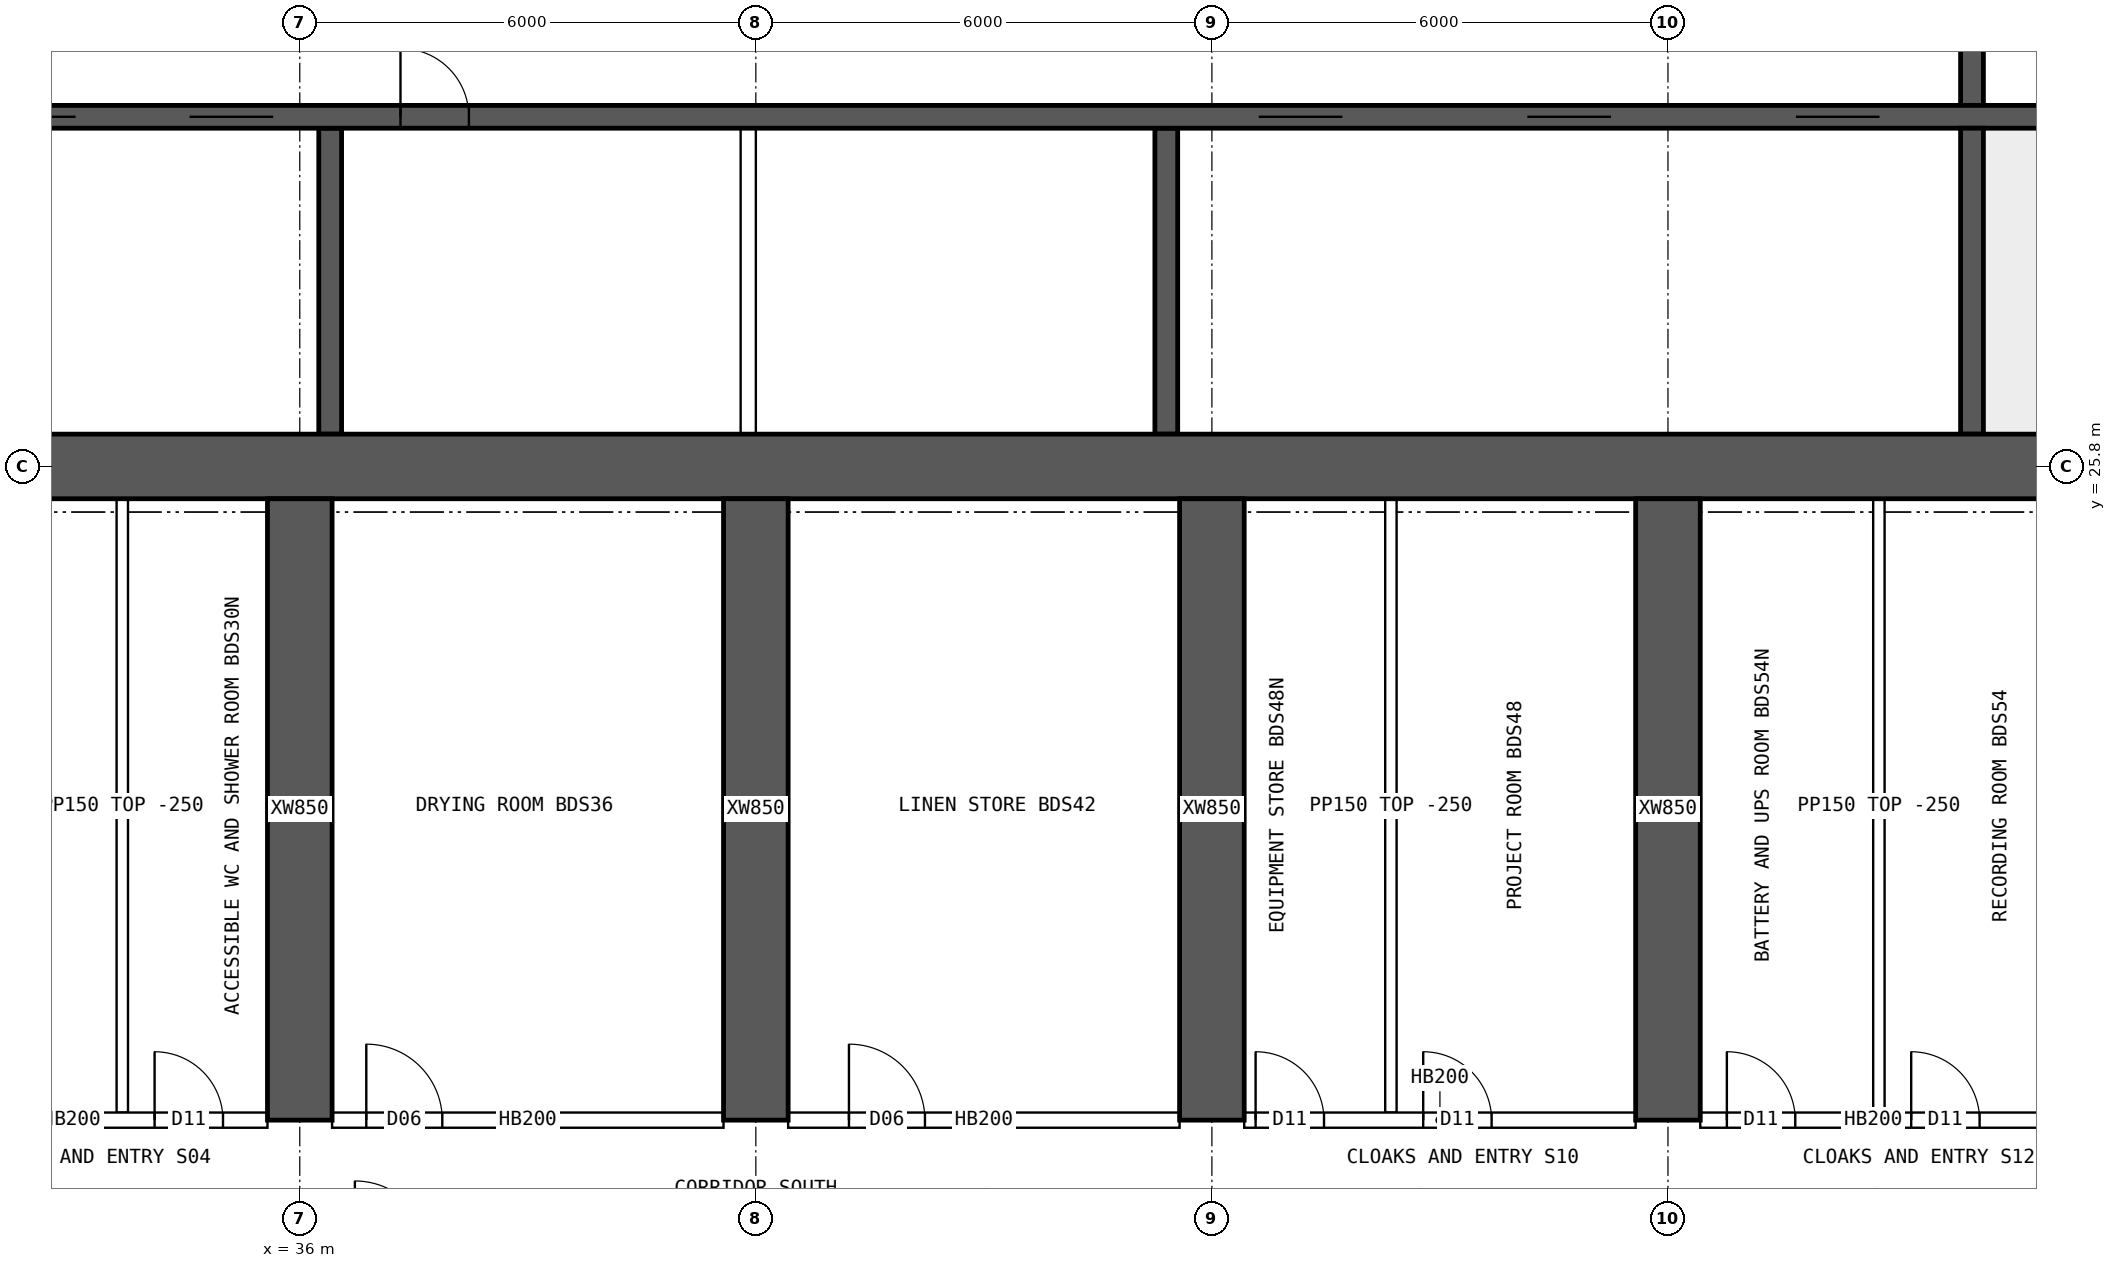
"""IFC4 building model, lengths in metres.
Left out: names, types, materials, properties, quantities, classifications, styles, units other than length and angle.
Written with IfcOpenShell. Run it as: python <this file> out.ifc"""

import sys

from ifc_helpers import new_model, si_unit, direction, frame, frame_2d, origin, place, context, subcontext, project, spatial, rectangle, extrude, element, fill, save


model = new_model("IFC4")
c1 = context("Model", 3, precision=1e-05, world=origin(), true_north=direction((0.0, 1.0)))
c2 = subcontext(c1, "Body", "Model", "MODEL_VIEW")
j1 = project(units=[si_unit("LENGTHUNIT", "METRE"), si_unit("PLANEANGLEUNIT", "RADIAN")], contexts=[c1])
p1 = place(None, origin())
s1 = spatial("IfcSite", under=j1, at=p1, CompositionType="ELEMENT")
p2 = place(p1, origin())
s2 = spatial("IfcBuilding", under=s1, at=p2, CompositionType="ELEMENT")
p3 = place(p2, frame((0.0, 0.0, 178.6)))
s3 = spatial("IfcBuildingStorey", under=s2, at=p3, CompositionType="ELEMENT", Elevation=178.6)
p4 = place(p3, frame((18.0, 25.8, 0.0), z_axis=(0.0, 0.0, 1.0), x_axis=(1.0, 0.0, 0.0)))
e1 = element("IfcWall", 1, at=p4, inside=s3, PredefinedType="SHEAR", context=c2, shape_type="SweptSolid", body=[
    extrude(rectangle(XDim=48.0, YDim=0.85, at=frame_2d((24.0, 0.0))), origin(), (0.0, 0.0, 1.0), 3.75),
])
p5 = place(p3, frame((18.425, 30.4, 0.0), z_axis=(0.0, 0.0, 1.0), x_axis=(1.0, 0.0, 0.0)))
e2 = element("IfcWall", 2, at=p5, inside=s3, PredefinedType="SHEAR", context=c2, shape_type="SweptSolid", body=[
    extrude(rectangle(XDim=47.15, YDim=0.3, at=frame_2d((23.575, 0.0))), origin(), (0.0, 0.0, 1.0), 3.75),
])
p6 = place(p5, frame((0.4, 0.0, 0.0)))
e3 = element("IfcOpeningElement", 3, at=p6, cuts=e2, PredefinedType="OPENING", context=c2, shape_type="SweptSolid", body=[
    extrude(rectangle(XDim=1.0, YDim=2.1, at=frame_2d((0.5, 1.05))), frame((0.0, 0.16, 0.0), z_axis=(0.0, -1.0, 0.0), x_axis=(1.0, 0.0, 0.0)), (0.0, 0.0, 1.0), 0.32),
])
p7 = place(p5, frame((45.75, 0.0, 0.0)))
e4 = element("IfcOpeningElement", 4, at=p7, cuts=e2, PredefinedType="OPENING", context=c2, shape_type="SweptSolid", body=[
    extrude(rectangle(XDim=1.0, YDim=2.1, at=frame_2d((0.5, 1.05))), frame((0.0, 0.16, 0.0), z_axis=(0.0, -1.0, 0.0), x_axis=(1.0, 0.0, 0.0)), (0.0, 0.0, 1.0), 0.32),
])
p8 = place(p5, frame((8.325, 0.0, 0.0)))
e5 = element("IfcOpeningElement", 5, at=p8, cuts=e2, PredefinedType="OPENING", context=c2, shape_type="SweptSolid", body=[
    extrude(rectangle(XDim=1.1, YDim=2.1, at=frame_2d((0.55, 1.05))), frame((0.0, 0.16, 0.0), z_axis=(0.0, -1.0, 0.0), x_axis=(1.0, 0.0, 0.0)), (0.0, 0.0, 1.0), 0.32),
])
p9 = place(p5, frame((10.925, 0.0, 0.0)))
e6 = element("IfcOpeningElement", 6, at=p9, cuts=e2, PredefinedType="OPENING", context=c2, shape_type="SweptSolid", body=[
    extrude(rectangle(XDim=1.1, YDim=2.1, at=frame_2d((0.55, 1.05))), frame((0.0, 0.16, 0.0), z_axis=(0.0, -1.0, 0.0), x_axis=(1.0, 0.0, 0.0)), (0.0, 0.0, 1.0), 0.32),
])
p10 = place(p5, frame((13.525, 0.0, 0.0)))
e7 = element("IfcOpeningElement", 7, at=p10, cuts=e2, PredefinedType="OPENING", context=c2, shape_type="SweptSolid", body=[
    extrude(rectangle(XDim=1.1, YDim=2.1, at=frame_2d((0.55, 1.05))), frame((0.0, 0.16, 0.0), z_axis=(0.0, -1.0, 0.0), x_axis=(1.0, 0.0, 0.0)), (0.0, 0.0, 1.0), 0.32),
])
p11 = place(p5, frame((16.125, 0.0, 0.0)))
e8 = element("IfcOpeningElement", 8, at=p11, cuts=e2, PredefinedType="OPENING", context=c2, shape_type="SweptSolid", body=[
    extrude(rectangle(XDim=1.1, YDim=2.1, at=frame_2d((0.55, 1.05))), frame((0.0, 0.16, 0.0), z_axis=(0.0, -1.0, 0.0), x_axis=(1.0, 0.0, 0.0)), (0.0, 0.0, 1.0), 0.32),
])
p12 = place(p5, frame((18.9, 0.0, 0.0)))
e9 = element("IfcOpeningElement", 9, at=p12, cuts=e2, PredefinedType="OPENING", context=c2, shape_type="SweptSolid", body=[
    extrude(rectangle(XDim=0.9, YDim=2.1, at=frame_2d((0.45, 1.05))), frame((0.0, 0.16, 0.0), z_axis=(0.0, -1.0, 0.0), x_axis=(1.0, 0.0, 0.0)), (0.0, 0.0, 1.0), 0.32),
])
p13 = place(p5, frame((30.192, 0.0, 0.0)))
e10 = element("IfcOpeningElement", 10, at=p13, cuts=e2, PredefinedType="OPENING", context=c2, shape_type="SweptSolid", body=[
    extrude(rectangle(XDim=1.1, YDim=2.1, at=frame_2d((0.55, 1.05))), frame((0.0, 0.16, 0.0), z_axis=(0.0, -1.0, 0.0), x_axis=(1.0, 0.0, 0.0)), (0.0, 0.0, 1.0), 0.32),
])
p14 = place(p5, frame((33.725, 0.0, 0.0)))
e11 = element("IfcOpeningElement", 11, at=p14, cuts=e2, PredefinedType="OPENING", context=c2, shape_type="SweptSolid", body=[
    extrude(rectangle(XDim=1.1, YDim=2.1, at=frame_2d((0.55, 1.05))), frame((0.0, 0.16, 0.0), z_axis=(0.0, -1.0, 0.0), x_axis=(1.0, 0.0, 0.0)), (0.0, 0.0, 1.0), 0.32),
])
p15 = place(p5, frame((37.258, 0.0, 0.0)))
e12 = element("IfcOpeningElement", 12, at=p15, cuts=e2, PredefinedType="OPENING", context=c2, shape_type="SweptSolid", body=[
    extrude(rectangle(XDim=1.1, YDim=2.1, at=frame_2d((0.55, 1.05))), frame((0.0, 0.16, 0.0), z_axis=(0.0, -1.0, 0.0), x_axis=(1.0, 0.0, 0.0)), (0.0, 0.0, 1.0), 0.32),
])
p16 = place(p3, frame((58.0, 26.225, 0.0), z_axis=(0.0, 0.0, 1.0), x_axis=(0.0, 1.0, 0.0)))
e13 = element("IfcWall", 13, at=p16, inside=s3, PredefinedType="SHEAR", context=c2, shape_type="SweptSolid", body=[
    extrude(rectangle(XDim=4.025, YDim=0.3, at=frame_2d((2.012, 0.0))), origin(), (0.0, 0.0, 1.0), 3.75),
])
p17 = place(p3, frame((58.0, 30.55, 0.0), z_axis=(0.0, 0.0, 1.0), x_axis=(0.0, 1.0, 0.0)))
e14 = element("IfcWall", 14, at=p17, inside=s3, PredefinedType="SHEAR", context=c2, shape_type="SweptSolid", body=[
    extrude(rectangle(XDim=3.9, YDim=0.3, at=frame_2d((1.95, 0.0))), origin(), (0.0, 0.0, 1.0), 3.75),
])
p18 = place(p17, frame((1.4, 0.0, 0.0)))
e15 = element("IfcOpeningElement", 15, at=p18, cuts=e14, PredefinedType="OPENING", context=c2, shape_type="SweptSolid", body=[
    extrude(rectangle(XDim=1.2, YDim=2.1, at=frame_2d((0.6, 1.05))), frame((0.0, 0.16, 0.0), z_axis=(0.0, -1.0, 0.0), x_axis=(1.0, 0.0, 0.0)), (0.0, 0.0, 1.0), 0.32),
])
for number, where, z_axis, x_axis in (
    (16, (36.4, 26.225, 0.0), (0.0, 0.0, 1.0), (0.0, 1.0, 0.0)),
    (17, (47.4, 26.225, 0.0), (0.0, 0.0, 1.0), (0.0, 1.0, 0.0)),
):
    element("IfcWall", number, at=place(p3, frame(where, z_axis=z_axis, x_axis=x_axis)), inside=s3, PredefinedType="SHEAR", context=c2, shape_type="SweptSolid", body=[
        extrude(rectangle(XDim=4.025, YDim=0.3, at=frame_2d((2.012, 0.0))), origin(), (0.0, 0.0, 1.0), 3.75),
    ])
for number, where, z_axis, x_axis in (
    (18, (36.0, 17.2, 0.0), (0.0, 0.0, 1.0), (0.0, 1.0, 0.0)),
    (19, (42.0, 17.2, 0.0), (0.0, 0.0, 1.0), (0.0, 1.0, 0.0)),
    (20, (48.0, 17.2, 0.0), (0.0, 0.0, 1.0), (0.0, 1.0, 0.0)),
    (21, (54.0, 17.2, 0.0), (0.0, 0.0, 1.0), (0.0, 1.0, 0.0)),
):
    element("IfcWall", number, at=place(p3, frame(where, z_axis=z_axis, x_axis=x_axis)), inside=s3, PredefinedType="SHEAR", context=c2, shape_type="SweptSolid", body=[
        extrude(rectangle(XDim=8.175, YDim=0.85, at=frame_2d((4.087, 0.0))), origin(), (0.0, 0.0, 1.0), 3.75),
    ])
p19 = place(p3, frame((41.9, 26.225, 0.0), z_axis=(0.0, 0.0, 1.0), x_axis=(0.0, 1.0, 0.0)))
e22 = element("IfcWall", 22, at=p19, inside=s3, PredefinedType="SOLIDWALL", context=c2, shape_type="SweptSolid", body=[
    extrude(rectangle(XDim=4.025, YDim=0.2, at=frame_2d((2.012, 0.0))), origin(), (0.0, 0.0, 1.0), 3.5),
])
p20 = place(p3, frame((30.425, 17.2, 0.0), z_axis=(0.0, 0.0, 1.0), x_axis=(1.0, 0.0, 0.0)))
e23 = element("IfcWall", 23, at=p20, inside=s3, PredefinedType="SOLIDWALL", context=c2, shape_type="SweptSolid", body=[
    extrude(rectangle(XDim=5.15, YDim=0.2, at=frame_2d((2.575, 0.0))), origin(), (0.0, 0.0, 1.0), 3.5),
])
p21 = place(p20, frame((0.35, 0.0, 0.0)))
e24 = element("IfcOpeningElement", 24, at=p21, cuts=e23, PredefinedType="OPENING", context=c2, shape_type="SweptSolid", body=[
    extrude(rectangle(XDim=0.9, YDim=2.1, at=frame_2d((0.45, 1.05))), frame((0.0, 0.11, 0.0), z_axis=(0.0, -1.0, 0.0), x_axis=(1.0, 0.0, 0.0)), (0.0, 0.0, 1.0), 0.22),
])
p22 = place(p20, frame((3.665, 0.0, 0.0)))
e25 = element("IfcOpeningElement", 25, at=p22, cuts=e23, PredefinedType="OPENING", context=c2, shape_type="SweptSolid", body=[
    extrude(rectangle(XDim=0.9, YDim=2.1, at=frame_2d((0.45, 1.05))), frame((0.0, 0.11, 0.0), z_axis=(0.0, -1.0, 0.0), x_axis=(1.0, 0.0, 0.0)), (0.0, 0.0, 1.0), 0.22),
])
p23 = place(p3, frame((36.425, 17.2, 0.0), z_axis=(0.0, 0.0, 1.0), x_axis=(1.0, 0.0, 0.0)))
e26 = element("IfcWall", 26, at=p23, inside=s3, PredefinedType="SOLIDWALL", context=c2, shape_type="SweptSolid", body=[
    extrude(rectangle(XDim=5.15, YDim=0.2, at=frame_2d((2.575, 0.0))), origin(), (0.0, 0.0, 1.0), 3.5),
])
p24 = place(p23, frame((0.45, 0.0, 0.0)))
e27 = element("IfcOpeningElement", 27, at=p24, cuts=e26, PredefinedType="OPENING", context=c2, shape_type="SweptSolid", body=[
    extrude(rectangle(XDim=1.0, YDim=2.1, at=frame_2d((0.5, 1.05))), frame((0.0, 0.11, 0.0), z_axis=(0.0, -1.0, 0.0), x_axis=(1.0, 0.0, 0.0)), (0.0, 0.0, 1.0), 0.22),
])
p25 = place(p3, frame((42.425, 17.2, 0.0), z_axis=(0.0, 0.0, 1.0), x_axis=(1.0, 0.0, 0.0)))
e28 = element("IfcWall", 28, at=p25, inside=s3, PredefinedType="SOLIDWALL", context=c2, shape_type="SweptSolid", body=[
    extrude(rectangle(XDim=5.15, YDim=0.2, at=frame_2d((2.575, 0.0))), origin(), (0.0, 0.0, 1.0), 3.5),
])
p26 = place(p25, frame((0.8, 0.0, 0.0)))
e29 = element("IfcOpeningElement", 29, at=p26, cuts=e28, PredefinedType="OPENING", context=c2, shape_type="SweptSolid", body=[
    extrude(rectangle(XDim=1.0, YDim=2.1, at=frame_2d((0.5, 1.05))), frame((0.0, 0.11, 0.0), z_axis=(0.0, -1.0, 0.0), x_axis=(1.0, 0.0, 0.0)), (0.0, 0.0, 1.0), 0.22),
])
p27 = place(p3, frame((48.425, 17.2, 0.0), z_axis=(0.0, 0.0, 1.0), x_axis=(1.0, 0.0, 0.0)))
e30 = element("IfcWall", 30, at=p27, inside=s3, PredefinedType="SOLIDWALL", context=c2, shape_type="SweptSolid", body=[
    extrude(rectangle(XDim=5.15, YDim=0.2, at=frame_2d((2.575, 0.0))), origin(), (0.0, 0.0, 1.0), 3.5),
])
p28 = place(p27, frame((0.15, 0.0, 0.0)))
e31 = element("IfcOpeningElement", 31, at=p28, cuts=e30, PredefinedType="OPENING", context=c2, shape_type="SweptSolid", body=[
    extrude(rectangle(XDim=0.9, YDim=2.1, at=frame_2d((0.45, 1.05))), frame((0.0, 0.11, 0.0), z_axis=(0.0, -1.0, 0.0), x_axis=(1.0, 0.0, 0.0)), (0.0, 0.0, 1.0), 0.22),
])
p29 = place(p27, frame((2.355, 0.0, 0.0)))
e32 = element("IfcOpeningElement", 32, at=p29, cuts=e30, PredefinedType="OPENING", context=c2, shape_type="SweptSolid", body=[
    extrude(rectangle(XDim=0.9, YDim=2.1, at=frame_2d((0.45, 1.05))), frame((0.0, 0.11, 0.0), z_axis=(0.0, -1.0, 0.0), x_axis=(1.0, 0.0, 0.0)), (0.0, 0.0, 1.0), 0.22),
])
p30 = place(p3, frame((54.425, 17.2, 0.0), z_axis=(0.0, 0.0, 1.0), x_axis=(1.0, 0.0, 0.0)))
e33 = element("IfcWall", 33, at=p30, inside=s3, PredefinedType="SOLIDWALL", context=c2, shape_type="SweptSolid", body=[
    extrude(rectangle(XDim=5.15, YDim=0.2, at=frame_2d((2.575, 0.0))), origin(), (0.0, 0.0, 1.0), 3.5),
])
p31 = place(p30, frame((0.35, 0.0, 0.0)))
e34 = element("IfcOpeningElement", 34, at=p31, cuts=e33, PredefinedType="OPENING", context=c2, shape_type="SweptSolid", body=[
    extrude(rectangle(XDim=0.9, YDim=2.1, at=frame_2d((0.45, 1.05))), frame((0.0, 0.11, 0.0), z_axis=(0.0, -1.0, 0.0), x_axis=(1.0, 0.0, 0.0)), (0.0, 0.0, 1.0), 0.22),
])
p32 = place(p30, frame((2.775, 0.0, 0.0)))
e35 = element("IfcOpeningElement", 35, at=p32, cuts=e33, PredefinedType="OPENING", context=c2, shape_type="SweptSolid", body=[
    extrude(rectangle(XDim=0.9, YDim=2.1, at=frame_2d((0.45, 1.05))), frame((0.0, 0.11, 0.0), z_axis=(0.0, -1.0, 0.0), x_axis=(1.0, 0.0, 0.0)), (0.0, 0.0, 1.0), 0.22),
])
for number, where, z_axis, x_axis in (
    (36, (33.665, 17.3, 0.0), (0.0, 0.0, 1.0), (0.0, 1.0, 0.0)),
    (37, (50.355, 17.3, 0.0), (0.0, 0.0, 1.0), (0.0, 1.0, 0.0)),
    (38, (56.775, 17.3, 0.0), (0.0, 0.0, 1.0), (0.0, 1.0, 0.0)),
):
    element("IfcWall", number, at=place(p3, frame(where, z_axis=z_axis, x_axis=x_axis)), inside=s3, PredefinedType="PARTITIONING", context=c2, shape_type="SweptSolid", body=[
        extrude(rectangle(XDim=8.075, YDim=0.15, at=frame_2d((4.038, 0.0))), origin(), (0.0, 0.0, 1.0), 3.5),
    ])
p33 = place(p10, origin())
e39 = element("IfcDoor", 39, at=p33, inside=s3, OperationType="DOUBLE_DOOR_SLIDING", PredefinedType="DOOR", context=c2, shape_type="SweptSolid", body=[
    extrude(rectangle(XDim=1.1, YDim=2.1, at=frame_2d((0.55, 1.05))), frame((0.0, 0.025, 0.0), z_axis=(0.0, -1.0, 0.0), x_axis=(1.0, 0.0, 0.0)), (0.0, 0.0, 1.0), 0.05),
])
fill(e7, e39)
p34 = place(p11, origin())
e40 = element("IfcDoor", 40, at=p34, inside=s3, OperationType="DOUBLE_DOOR_SLIDING", PredefinedType="DOOR", context=c2, shape_type="SweptSolid", body=[
    extrude(rectangle(XDim=1.1, YDim=2.1, at=frame_2d((0.55, 1.05))), frame((0.0, 0.025, 0.0), z_axis=(0.0, -1.0, 0.0), x_axis=(1.0, 0.0, 0.0)), (0.0, 0.0, 1.0), 0.05),
])
fill(e8, e40)
p35 = place(p12, origin())
e41 = element("IfcDoor", 41, at=p35, inside=s3, OperationType="SINGLE_SWING_LEFT", PredefinedType="DOOR", context=c2, shape_type="SweptSolid", body=[
    extrude(rectangle(XDim=0.9, YDim=2.1, at=frame_2d((0.45, 1.05))), frame((0.0, 0.025, 0.0), z_axis=(0.0, -1.0, 0.0), x_axis=(1.0, 0.0, 0.0)), (0.0, 0.0, 1.0), 0.05),
])
fill(e9, e41)
p36 = place(p13, origin())
e42 = element("IfcDoor", 42, at=p36, inside=s3, OperationType="DOUBLE_DOOR_SLIDING", PredefinedType="DOOR", context=c2, shape_type="SweptSolid", body=[
    extrude(rectangle(XDim=1.1, YDim=2.1, at=frame_2d((0.55, 1.05))), frame((0.0, 0.025, 0.0), z_axis=(0.0, -1.0, 0.0), x_axis=(1.0, 0.0, 0.0)), (0.0, 0.0, 1.0), 0.05),
])
fill(e10, e42)
p37 = place(p14, origin())
e43 = element("IfcDoor", 43, at=p37, inside=s3, OperationType="DOUBLE_DOOR_SLIDING", PredefinedType="DOOR", context=c2, shape_type="SweptSolid", body=[
    extrude(rectangle(XDim=1.1, YDim=2.1, at=frame_2d((0.55, 1.05))), frame((0.0, 0.025, 0.0), z_axis=(0.0, -1.0, 0.0), x_axis=(1.0, 0.0, 0.0)), (0.0, 0.0, 1.0), 0.05),
])
fill(e11, e43)
p38 = place(p15, origin())
e44 = element("IfcDoor", 44, at=p38, inside=s3, OperationType="DOUBLE_DOOR_SLIDING", PredefinedType="DOOR", context=c2, shape_type="SweptSolid", body=[
    extrude(rectangle(XDim=1.1, YDim=2.1, at=frame_2d((0.55, 1.05))), frame((0.0, 0.025, 0.0), z_axis=(0.0, -1.0, 0.0), x_axis=(1.0, 0.0, 0.0)), (0.0, 0.0, 1.0), 0.05),
])
fill(e12, e44)
p39 = place(p22, origin())
e45 = element("IfcDoor", 45, at=p39, inside=s3, OperationType="SINGLE_SWING_LEFT", PredefinedType="DOOR", context=c2, shape_type="SweptSolid", body=[
    extrude(rectangle(XDim=0.9, YDim=2.1, at=frame_2d((0.45, 1.05))), frame((0.0, 0.025, 0.0), z_axis=(0.0, -1.0, 0.0), x_axis=(1.0, 0.0, 0.0)), (0.0, 0.0, 1.0), 0.05),
])
fill(e25, e45)
p40 = place(p24, origin())
e46 = element("IfcDoor", 46, at=p40, inside=s3, OperationType="SINGLE_SWING_LEFT", PredefinedType="DOOR", context=c2, shape_type="SweptSolid", body=[
    extrude(rectangle(XDim=1.0, YDim=2.1, at=frame_2d((0.5, 1.05))), frame((0.0, 0.025, 0.0), z_axis=(0.0, -1.0, 0.0), x_axis=(1.0, 0.0, 0.0)), (0.0, 0.0, 1.0), 0.05),
])
fill(e27, e46)
p41 = place(p26, origin())
e47 = element("IfcDoor", 47, at=p41, inside=s3, OperationType="SINGLE_SWING_LEFT", PredefinedType="DOOR", context=c2, shape_type="SweptSolid", body=[
    extrude(rectangle(XDim=1.0, YDim=2.1, at=frame_2d((0.5, 1.05))), frame((0.0, 0.025, 0.0), z_axis=(0.0, -1.0, 0.0), x_axis=(1.0, 0.0, 0.0)), (0.0, 0.0, 1.0), 0.05),
])
fill(e29, e47)
p42 = place(p28, origin())
e48 = element("IfcDoor", 48, at=p42, inside=s3, OperationType="SINGLE_SWING_LEFT", PredefinedType="DOOR", context=c2, shape_type="SweptSolid", body=[
    extrude(rectangle(XDim=0.9, YDim=2.1, at=frame_2d((0.45, 1.05))), frame((0.0, 0.025, 0.0), z_axis=(0.0, -1.0, 0.0), x_axis=(1.0, 0.0, 0.0)), (0.0, 0.0, 1.0), 0.05),
])
fill(e31, e48)
p43 = place(p29, origin())
e49 = element("IfcDoor", 49, at=p43, inside=s3, OperationType="SINGLE_SWING_LEFT", PredefinedType="DOOR", context=c2, shape_type="SweptSolid", body=[
    extrude(rectangle(XDim=0.9, YDim=2.1, at=frame_2d((0.45, 1.05))), frame((0.0, 0.025, 0.0), z_axis=(0.0, -1.0, 0.0), x_axis=(1.0, 0.0, 0.0)), (0.0, 0.0, 1.0), 0.05),
])
fill(e32, e49)
p44 = place(p31, origin())
e50 = element("IfcDoor", 50, at=p44, inside=s3, OperationType="SINGLE_SWING_LEFT", PredefinedType="DOOR", context=c2, shape_type="SweptSolid", body=[
    extrude(rectangle(XDim=0.9, YDim=2.1, at=frame_2d((0.45, 1.05))), frame((0.0, 0.025, 0.0), z_axis=(0.0, -1.0, 0.0), x_axis=(1.0, 0.0, 0.0)), (0.0, 0.0, 1.0), 0.05),
])
fill(e34, e50)
p45 = place(p32, origin())
e51 = element("IfcDoor", 51, at=p45, inside=s3, OperationType="SINGLE_SWING_LEFT", PredefinedType="DOOR", context=c2, shape_type="SweptSolid", body=[
    extrude(rectangle(XDim=0.9, YDim=2.1, at=frame_2d((0.45, 1.05))), frame((0.0, 0.025, 0.0), z_axis=(0.0, -1.0, 0.0), x_axis=(1.0, 0.0, 0.0)), (0.0, 0.0, 1.0), 0.05),
])
fill(e35, e51)
save(model, sys.argv[1])
